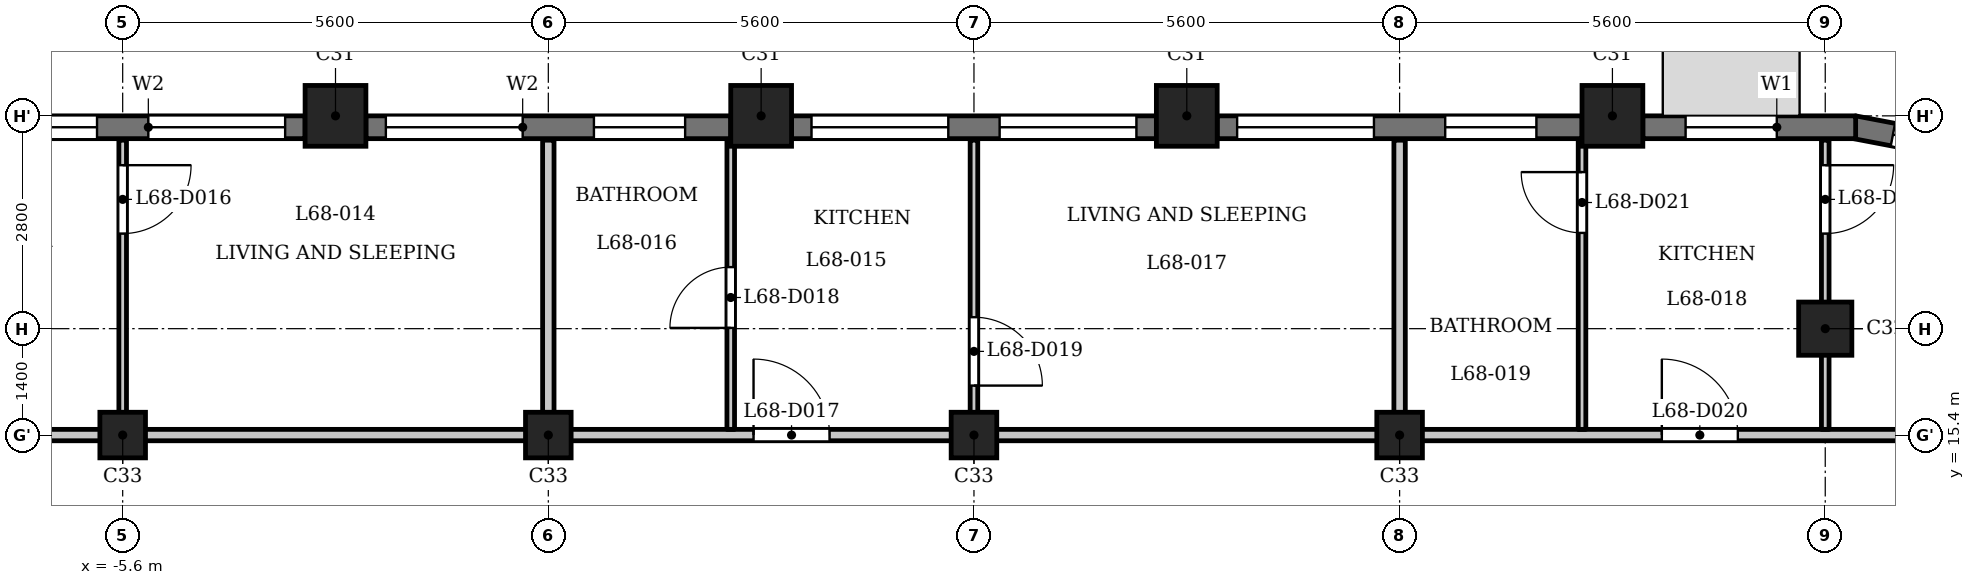
"""IFC4 building model, lengths in metres.
Left out: names, types, materials, properties, quantities, classifications, styles, units other than length and angle.
Written with IfcOpenShell. Run it as: python <this file> out.ifc"""

import sys

from ifc_helpers import new_model, si_unit, direction, frame, frame_2d, origin, origin_2d, place, context, subcontext, project, spatial, rectangle, extrude, element, fill, save


model = new_model("IFC4")
c1 = context("Model", 3, precision=1e-05, world=origin(), true_north=direction((0.0, 1.0)))
c2 = subcontext(c1, "Body", "Model", "MODEL_VIEW")
j1 = project(units=[si_unit("LENGTHUNIT", "METRE"), si_unit("PLANEANGLEUNIT", "RADIAN")], contexts=[c1])
p1 = place(None, origin())
s1 = spatial("IfcSite", under=j1, at=p1, CompositionType="ELEMENT")
p2 = place(p1, origin())
s2 = spatial("IfcBuilding", under=s1, at=p2, CompositionType="ELEMENT")
p3 = place(p2, frame((0.0, 0.0, 262.7)))
s3 = spatial("IfcBuildingStorey", under=s2, at=p3, CompositionType="ELEMENT", Elevation=262.7)
for number, where, z_axis, x_axis in (
    (1, (14.0, 19.6, 0.0), (0.0, 0.0, 1.0), (1.0, 0.0, 0.0)),
    (2, (8.4, 19.6, 0.0), (0.0, 0.0, 1.0), (1.0, 0.0, 0.0)),
    (3, (2.8, 19.6, 0.0), (0.0, 0.0, 1.0), (1.0, 0.0, 0.0)),
    (4, (-2.8, 19.6, 0.0), (0.0, 0.0, 1.0), (1.0, 0.0, 0.0)),
):
    element("IfcColumn", number, at=place(p3, frame(where, z_axis=z_axis, x_axis=x_axis)), inside=s3, PredefinedType="COLUMN", context=c2, shape_type="SweptSolid", body=[
        extrude(rectangle(XDim=0.8, YDim=0.8, at=origin_2d()), origin(), (0.0, 0.0, 1.0), 3.5),
    ])
p4 = place(p3, frame((16.8, 16.8, 0.0), z_axis=(0.0, 0.0, 1.0), x_axis=(1.0, 0.0, 0.0)))
e5 = element("IfcColumn", 5, at=p4, inside=s3, PredefinedType="COLUMN", context=c2, shape_type="SweptSolid", body=[
    extrude(rectangle(XDim=0.7, YDim=0.7, at=origin_2d()), origin(), (0.0, 0.0, 1.0), 3.5),
])
for number, where, z_axis, x_axis in (
    (6, (-5.6, 15.4, 0.0), (0.0, 0.0, 1.0), (1.0, 0.0, 0.0)),
    (7, (0.0, 15.4, 0.0), (0.0, 0.0, 1.0), (1.0, 0.0, 0.0)),
    (8, (5.6, 15.4, 0.0), (0.0, 0.0, 1.0), (1.0, 0.0, 0.0)),
    (9, (11.2, 15.4, 0.0), (0.0, 0.0, 1.0), (1.0, 0.0, 0.0)),
):
    element("IfcColumn", number, at=place(p3, frame(where, z_axis=z_axis, x_axis=x_axis)), inside=s3, PredefinedType="COLUMN", context=c2, shape_type="SweptSolid", body=[
        extrude(rectangle(XDim=0.6, YDim=0.6, at=origin_2d()), origin(), (0.0, 0.0, 1.0), 3.5),
    ])
p5 = place(p3, frame((18.995, 19.105, 0.0), z_axis=(0.0, 0.0, 1.0), x_axis=(-0.982301706131, 0.187305520826, 0.0)))
e10 = element("IfcWall", 10, at=p5, inside=s3, PredefinedType="SOLIDWALL", context=c2, shape_type="SweptSolid", body=[
    extrude(rectangle(XDim=1.856, YDim=0.3, at=frame_2d((0.928, 0.0))), origin(), (0.0, 0.0, 1.0), 2.55),
])
p6 = place(p5, frame((0.528, 0.0, 0.6)))
e11 = element("IfcOpeningElement", 11, at=p6, cuts=e10, PredefinedType="OPENING", context=c2, shape_type="SweptSolid", body=[
    extrude(rectangle(XDim=0.8, YDim=1.55, at=frame_2d((0.4, 0.775))), frame((0.0, 0.16, 0.0), z_axis=(0.0, -1.0, 0.0), x_axis=(1.0, 0.0, 0.0)), (0.0, 0.0, 1.0), 0.32),
])
p7 = place(p3, frame((17.2, 19.45, 0.0), z_axis=(0.0, 0.0, 1.0), x_axis=(-1.0, 0.0, 0.0)))
e12 = element("IfcWall", 12, at=p7, inside=s3, PredefinedType="SOLIDWALL", context=c2, shape_type="SweptSolid", body=[
    extrude(rectangle(XDim=2.8, YDim=0.3, at=frame_2d((1.4, 0.0))), origin(), (0.0, 0.0, 1.0), 2.55),
])
p8 = place(p7, frame((1.038, 0.0, 0.6)))
e13 = element("IfcOpeningElement", 13, at=p8, cuts=e12, PredefinedType="OPENING", context=c2, shape_type="SweptSolid", body=[
    extrude(rectangle(XDim=1.2, YDim=1.55, at=frame_2d((0.6, 0.775))), frame((0.0, 0.16, 0.0), z_axis=(0.0, -1.0, 0.0), x_axis=(1.0, 0.0, 0.0)), (0.0, 0.0, 1.0), 0.32),
])
p9 = place(p3, frame((13.6, 19.45, 0.0), z_axis=(0.0, 0.0, 1.0), x_axis=(-1.0, 0.0, 0.0)))
e14 = element("IfcWall", 14, at=p9, inside=s3, PredefinedType="SOLIDWALL", context=c2, shape_type="SweptSolid", body=[
    extrude(rectangle(XDim=4.8, YDim=0.3, at=frame_2d((2.4, 0.0))), origin(), (0.0, 0.0, 1.0), 2.55),
])
p10 = place(p9, frame((0.6, 0.0, 0.6)))
e15 = element("IfcOpeningElement", 15, at=p10, cuts=e14, PredefinedType="OPENING", context=c2, shape_type="SweptSolid", body=[
    extrude(rectangle(XDim=1.2, YDim=1.55, at=frame_2d((0.6, 0.775))), frame((0.0, 0.16, 0.0), z_axis=(0.0, -1.0, 0.0), x_axis=(1.0, 0.0, 0.0)), (0.0, 0.0, 1.0), 0.32),
])
p11 = place(p9, frame((2.738, 0.0, 0.9)))
e16 = element("IfcOpeningElement", 16, at=p11, cuts=e14, PredefinedType="OPENING", context=c2, shape_type="SweptSolid", body=[
    extrude(rectangle(XDim=1.8, YDim=1.25, at=frame_2d((0.9, 0.625))), frame((0.0, 0.16, 0.0), z_axis=(0.0, -1.0, 0.0), x_axis=(1.0, 0.0, 0.0)), (0.0, 0.0, 1.0), 0.32),
])
p12 = place(p3, frame((8.0, 19.45, 0.0), z_axis=(0.0, 0.0, 1.0), x_axis=(-1.0, 0.0, 0.0)))
e17 = element("IfcWall", 17, at=p12, inside=s3, PredefinedType="SOLIDWALL", context=c2, shape_type="SweptSolid", body=[
    extrude(rectangle(XDim=4.8, YDim=0.3, at=frame_2d((2.4, 0.0))), origin(), (0.0, 0.0, 1.0), 2.55),
])
p13 = place(p12, frame((0.262, 0.0, 0.9)))
e18 = element("IfcOpeningElement", 18, at=p13, cuts=e17, PredefinedType="OPENING", context=c2, shape_type="SweptSolid", body=[
    extrude(rectangle(XDim=1.8, YDim=1.25, at=frame_2d((0.9, 0.625))), frame((0.0, 0.16, 0.0), z_axis=(0.0, -1.0, 0.0), x_axis=(1.0, 0.0, 0.0)), (0.0, 0.0, 1.0), 0.32),
])
p14 = place(p12, frame((2.738, 0.0, 0.9)))
e19 = element("IfcOpeningElement", 19, at=p14, cuts=e17, PredefinedType="OPENING", context=c2, shape_type="SweptSolid", body=[
    extrude(rectangle(XDim=1.8, YDim=1.25, at=frame_2d((0.9, 0.625))), frame((0.0, 0.16, 0.0), z_axis=(0.0, -1.0, 0.0), x_axis=(1.0, 0.0, 0.0)), (0.0, 0.0, 1.0), 0.32),
])
p15 = place(p3, frame((2.4, 19.45, 0.0), z_axis=(0.0, 0.0, 1.0), x_axis=(-1.0, 0.0, 0.0)))
e20 = element("IfcWall", 20, at=p15, inside=s3, PredefinedType="SOLIDWALL", context=c2, shape_type="SweptSolid", body=[
    extrude(rectangle(XDim=4.8, YDim=0.3, at=frame_2d((2.4, 0.0))), origin(), (0.0, 0.0, 1.0), 2.55),
])
p16 = place(p15, frame((0.6, 0.0, 0.6)))
e21 = element("IfcOpeningElement", 21, at=p16, cuts=e20, PredefinedType="OPENING", context=c2, shape_type="SweptSolid", body=[
    extrude(rectangle(XDim=1.2, YDim=1.55, at=frame_2d((0.6, 0.775))), frame((0.0, 0.16, 0.0), z_axis=(0.0, -1.0, 0.0), x_axis=(1.0, 0.0, 0.0)), (0.0, 0.0, 1.0), 0.32),
])
p17 = place(p15, frame((2.738, 0.0, 0.9)))
e22 = element("IfcOpeningElement", 22, at=p17, cuts=e20, PredefinedType="OPENING", context=c2, shape_type="SweptSolid", body=[
    extrude(rectangle(XDim=1.8, YDim=1.25, at=frame_2d((0.9, 0.625))), frame((0.0, 0.16, 0.0), z_axis=(0.0, -1.0, 0.0), x_axis=(1.0, 0.0, 0.0)), (0.0, 0.0, 1.0), 0.32),
])
p18 = place(p3, frame((-3.2, 19.45, 0.0), z_axis=(0.0, 0.0, 1.0), x_axis=(-1.0, 0.0, 0.0)))
e23 = element("IfcWall", 23, at=p18, inside=s3, PredefinedType="SOLIDWALL", context=c2, shape_type="SweptSolid", body=[
    extrude(rectangle(XDim=4.8, YDim=0.3, at=frame_2d((2.4, 0.0))), origin(), (0.0, 0.0, 1.0), 2.55),
])
p19 = place(p18, frame((0.262, 0.0, 0.9)))
e24 = element("IfcOpeningElement", 24, at=p19, cuts=e23, PredefinedType="OPENING", context=c2, shape_type="SweptSolid", body=[
    extrude(rectangle(XDim=1.8, YDim=1.25, at=frame_2d((0.9, 0.625))), frame((0.0, 0.16, 0.0), z_axis=(0.0, -1.0, 0.0), x_axis=(1.0, 0.0, 0.0)), (0.0, 0.0, 1.0), 0.32),
])
p20 = place(p18, frame((2.738, 0.0, 0.9)))
e25 = element("IfcOpeningElement", 25, at=p20, cuts=e23, PredefinedType="OPENING", context=c2, shape_type="SweptSolid", body=[
    extrude(rectangle(XDim=1.8, YDim=1.25, at=frame_2d((0.9, 0.625))), frame((0.0, 0.16, 0.0), z_axis=(0.0, -1.0, 0.0), x_axis=(1.0, 0.0, 0.0)), (0.0, 0.0, 1.0), 0.32),
])
p21 = place(p3, frame((-23.55, 15.4, 0.0), z_axis=(0.0, 0.0, 1.0), x_axis=(1.0, 0.0, 0.0)))
e26 = element("IfcWall", 26, at=p21, inside=s3, PredefinedType="PARTITIONING", context=c2, shape_type="SweptSolid", body=[
    extrude(rectangle(XDim=46.872, YDim=0.15, at=frame_2d((23.436, 0.0))), origin(), (0.0, 0.0, 1.0), 3.2),
])
p22 = place(p21, frame((8.05, 0.0, 0.0)))
e27 = element("IfcOpeningElement", 27, at=p22, cuts=e26, PredefinedType="OPENING", context=c2, shape_type="SweptSolid", body=[
    extrude(rectangle(XDim=1.0, YDim=2.1, at=frame_2d((0.5, 1.05))), frame((0.0, 0.085, 0.0), z_axis=(0.0, -1.0, 0.0), x_axis=(1.0, 0.0, 0.0)), (0.0, 0.0, 1.0), 0.17),
])
p23 = place(p21, frame((15.05, 0.0, 0.0)))
e28 = element("IfcOpeningElement", 28, at=p23, cuts=e26, PredefinedType="OPENING", context=c2, shape_type="SweptSolid", body=[
    extrude(rectangle(XDim=1.0, YDim=2.1, at=frame_2d((0.5, 1.05))), frame((0.0, 0.085, 0.0), z_axis=(0.0, -1.0, 0.0), x_axis=(1.0, 0.0, 0.0)), (0.0, 0.0, 1.0), 0.17),
])
p24 = place(p21, frame((26.25, 0.0, 0.0)))
e29 = element("IfcOpeningElement", 29, at=p24, cuts=e26, PredefinedType="OPENING", context=c2, shape_type="SweptSolid", body=[
    extrude(rectangle(XDim=1.0, YDim=2.1, at=frame_2d((0.5, 1.05))), frame((0.0, 0.085, 0.0), z_axis=(0.0, -1.0, 0.0), x_axis=(1.0, 0.0, 0.0)), (0.0, 0.0, 1.0), 0.17),
])
p25 = place(p21, frame((38.2, 0.0, 0.0)))
e30 = element("IfcOpeningElement", 30, at=p25, cuts=e26, PredefinedType="OPENING", context=c2, shape_type="SweptSolid", body=[
    extrude(rectangle(XDim=1.0, YDim=2.1, at=frame_2d((0.5, 1.05))), frame((0.0, 0.085, 0.0), z_axis=(0.0, -1.0, 0.0), x_axis=(1.0, 0.0, 0.0)), (0.0, 0.0, 1.0), 0.17),
])
p26 = place(p3, frame((-5.6, 15.475, 0.0), z_axis=(0.0, 0.0, 1.0), x_axis=(0.0, 1.0, 0.0)))
e31 = element("IfcWall", 31, at=p26, inside=s3, PredefinedType="PARTITIONING", context=c2, shape_type="SweptSolid", body=[
    extrude(rectangle(XDim=3.805, YDim=0.1, at=frame_2d((1.902, 0.0))), origin(), (0.0, 0.0, 1.0), 3.2),
])
p27 = place(p26, frame((2.576, 0.0, 0.0)))
e32 = element("IfcOpeningElement", 32, at=p27, cuts=e31, PredefinedType="OPENING", context=c2, shape_type="SweptSolid", body=[
    extrude(rectangle(XDim=0.9, YDim=2.1, at=frame_2d((0.45, 1.05))), frame((0.0, 0.06, 0.0), z_axis=(0.0, -1.0, 0.0), x_axis=(1.0, 0.0, 0.0)), (0.0, 0.0, 1.0), 0.12),
])
p28 = place(p3, frame((0.0, 15.475, 0.0), z_axis=(0.0, 0.0, 1.0), x_axis=(0.0, 1.0, 0.0)))
e33 = element("IfcWall", 33, at=p28, inside=s3, PredefinedType="PARTITIONING", context=c2, shape_type="SweptSolid", body=[
    extrude(rectangle(XDim=3.805, YDim=0.15, at=frame_2d((1.902, 0.0))), origin(), (0.0, 0.0, 1.0), 3.2),
])
p29 = place(p3, frame((2.4, 15.475, 0.0), z_axis=(0.0, 0.0, 1.0), x_axis=(0.0, 1.0, 0.0)))
e34 = element("IfcWall", 34, at=p29, inside=s3, PredefinedType="PARTITIONING", context=c2, shape_type="SweptSolid", body=[
    extrude(rectangle(XDim=3.805, YDim=0.1, at=frame_2d((1.902, 0.0))), origin(), (0.0, 0.0, 1.0), 3.2),
])
p30 = place(p29, frame((1.335, 0.0, 0.0)))
e35 = element("IfcOpeningElement", 35, at=p30, cuts=e34, PredefinedType="OPENING", context=c2, shape_type="SweptSolid", body=[
    extrude(rectangle(XDim=0.8, YDim=2.1, at=frame_2d((0.4, 1.05))), frame((0.0, 0.06, 0.0), z_axis=(0.0, -1.0, 0.0), x_axis=(1.0, 0.0, 0.0)), (0.0, 0.0, 1.0), 0.12),
])
p31 = place(p3, frame((5.6, 15.475, 0.0), z_axis=(0.0, 0.0, 1.0), x_axis=(0.0, 1.0, 0.0)))
e36 = element("IfcWall", 36, at=p31, inside=s3, PredefinedType="PARTITIONING", context=c2, shape_type="SweptSolid", body=[
    extrude(rectangle(XDim=3.805, YDim=0.1, at=frame_2d((1.902, 0.0))), origin(), (0.0, 0.0, 1.0), 3.2),
])
p32 = place(p31, frame((0.576, 0.0, 0.0)))
e37 = element("IfcOpeningElement", 37, at=p32, cuts=e36, PredefinedType="OPENING", context=c2, shape_type="SweptSolid", body=[
    extrude(rectangle(XDim=0.9, YDim=2.1, at=frame_2d((0.45, 1.05))), frame((0.0, 0.06, 0.0), z_axis=(0.0, -1.0, 0.0), x_axis=(1.0, 0.0, 0.0)), (0.0, 0.0, 1.0), 0.12),
])
p33 = place(p3, frame((11.2, 15.475, 0.0), z_axis=(0.0, 0.0, 1.0), x_axis=(0.0, 1.0, 0.0)))
e38 = element("IfcWall", 38, at=p33, inside=s3, PredefinedType="PARTITIONING", context=c2, shape_type="SweptSolid", body=[
    extrude(rectangle(XDim=3.805, YDim=0.15, at=frame_2d((1.902, 0.0))), origin(), (0.0, 0.0, 1.0), 3.2),
])
p34 = place(p3, frame((13.6, 15.475, 0.0), z_axis=(0.0, 0.0, 1.0), x_axis=(0.0, 1.0, 0.0)))
e39 = element("IfcWall", 39, at=p34, inside=s3, PredefinedType="PARTITIONING", context=c2, shape_type="SweptSolid", body=[
    extrude(rectangle(XDim=3.805, YDim=0.1, at=frame_2d((1.902, 0.0))), origin(), (0.0, 0.0, 1.0), 3.2),
])
p35 = place(p34, frame((2.585, 0.0, 0.0)))
e40 = element("IfcOpeningElement", 40, at=p35, cuts=e39, PredefinedType="OPENING", context=c2, shape_type="SweptSolid", body=[
    extrude(rectangle(XDim=0.8, YDim=2.1, at=frame_2d((0.4, 1.05))), frame((0.0, 0.06, 0.0), z_axis=(0.0, -1.0, 0.0), x_axis=(1.0, 0.0, 0.0)), (0.0, 0.0, 1.0), 0.12),
])
p36 = place(p3, frame((16.8, 15.475, 0.0), z_axis=(0.0, 0.0, 1.0), x_axis=(0.0, 1.0, 0.0)))
e41 = element("IfcWall", 41, at=p36, inside=s3, PredefinedType="PARTITIONING", context=c2, shape_type="SweptSolid", body=[
    extrude(rectangle(XDim=3.805, YDim=0.1, at=frame_2d((1.902, 0.0))), origin(), (0.0, 0.0, 1.0), 3.2),
])
p37 = place(p36, frame((2.576, 0.0, 0.0)))
e42 = element("IfcOpeningElement", 42, at=p37, cuts=e41, PredefinedType="OPENING", context=c2, shape_type="SweptSolid", body=[
    extrude(rectangle(XDim=0.9, YDim=2.1, at=frame_2d((0.45, 1.05))), frame((0.0, 0.06, 0.0), z_axis=(0.0, -1.0, 0.0), x_axis=(1.0, 0.0, 0.0)), (0.0, 0.0, 1.0), 0.12),
])
p38 = place(p27, origin())
e43 = element("IfcDoor", 43, at=p38, inside=s3, OperationType="SINGLE_SWING_RIGHT", PredefinedType="DOOR", context=c2, shape_type="SweptSolid", body=[
    extrude(rectangle(XDim=0.9, YDim=2.1, at=frame_2d((0.45, 1.05))), frame((0.0, 0.025, 0.0), z_axis=(0.0, -1.0, 0.0), x_axis=(1.0, 0.0, 0.0)), (0.0, 0.0, 1.0), 0.05),
])
fill(e32, e43)
p39 = place(p24, origin())
e44 = element("IfcDoor", 44, at=p39, inside=s3, OperationType="SINGLE_SWING_RIGHT", PredefinedType="DOOR", context=c2, shape_type="SweptSolid", body=[
    extrude(rectangle(XDim=1.0, YDim=2.1, at=frame_2d((0.5, 1.05))), frame((0.0, 0.025, 0.0), z_axis=(0.0, -1.0, 0.0), x_axis=(1.0, 0.0, 0.0)), (0.0, 0.0, 1.0), 0.05),
])
fill(e29, e44)
p40 = place(p30, origin())
e45 = element("IfcDoor", 45, at=p40, inside=s3, OperationType="SINGLE_SWING_RIGHT", PredefinedType="DOOR", context=c2, shape_type="SweptSolid", body=[
    extrude(rectangle(XDim=0.8, YDim=2.1, at=frame_2d((0.4, 1.05))), frame((0.0, 0.025, 0.0), z_axis=(0.0, -1.0, 0.0), x_axis=(1.0, 0.0, 0.0)), (0.0, 0.0, 1.0), 0.05),
])
fill(e35, e45)
p41 = place(p32, origin())
e46 = element("IfcDoor", 46, at=p41, inside=s3, OperationType="SINGLE_SWING_LEFT", PredefinedType="DOOR", context=c2, shape_type="SweptSolid", body=[
    extrude(rectangle(XDim=0.9, YDim=2.1, at=frame_2d((0.45, 1.05))), frame((0.0, 0.025, 0.0), z_axis=(0.0, -1.0, 0.0), x_axis=(1.0, 0.0, 0.0)), (0.0, 0.0, 1.0), 0.05),
])
fill(e37, e46)
p42 = place(p25, origin())
e47 = element("IfcDoor", 47, at=p42, inside=s3, OperationType="SINGLE_SWING_RIGHT", PredefinedType="DOOR", context=c2, shape_type="SweptSolid", body=[
    extrude(rectangle(XDim=1.0, YDim=2.1, at=frame_2d((0.5, 1.05))), frame((0.0, 0.025, 0.0), z_axis=(0.0, -1.0, 0.0), x_axis=(1.0, 0.0, 0.0)), (0.0, 0.0, 1.0), 0.05),
])
fill(e30, e47)
p43 = place(p35, origin())
e48 = element("IfcDoor", 48, at=p43, inside=s3, OperationType="SINGLE_SWING_LEFT", PredefinedType="DOOR", context=c2, shape_type="SweptSolid", body=[
    extrude(rectangle(XDim=0.8, YDim=2.1, at=frame_2d((0.4, 1.05))), frame((0.0, 0.025, 0.0), z_axis=(0.0, -1.0, 0.0), x_axis=(1.0, 0.0, 0.0)), (0.0, 0.0, 1.0), 0.05),
])
fill(e40, e48)
p44 = place(p37, origin())
e49 = element("IfcDoor", 49, at=p44, inside=s3, OperationType="SINGLE_SWING_RIGHT", PredefinedType="DOOR", context=c2, shape_type="SweptSolid", body=[
    extrude(rectangle(XDim=0.9, YDim=2.1, at=frame_2d((0.45, 1.05))), frame((0.0, 0.025, 0.0), z_axis=(0.0, -1.0, 0.0), x_axis=(1.0, 0.0, 0.0)), (0.0, 0.0, 1.0), 0.05),
])
fill(e42, e49)
p45 = place(p6, origin())
e50 = element("IfcWindow", 50, at=p45, inside=s3, PartitioningType="SINGLE_PANEL", PredefinedType="WINDOW", context=c2, shape_type="SweptSolid", body=[
    extrude(rectangle(XDim=0.8, YDim=1.55, at=frame_2d((0.4, 0.775))), frame((0.0, 0.03, 0.0), z_axis=(0.0, -1.0, 0.0), x_axis=(1.0, 0.0, 0.0)), (0.0, 0.0, 1.0), 0.06),
])
fill(e11, e50)
p46 = place(p8, origin())
e51 = element("IfcWindow", 51, at=p46, inside=s3, PartitioningType="SINGLE_PANEL", PredefinedType="WINDOW", context=c2, shape_type="SweptSolid", body=[
    extrude(rectangle(XDim=1.2, YDim=1.55, at=frame_2d((0.6, 0.775))), frame((0.0, 0.03, 0.0), z_axis=(0.0, -1.0, 0.0), x_axis=(1.0, 0.0, 0.0)), (0.0, 0.0, 1.0), 0.06),
])
fill(e13, e51)
p47 = place(p10, origin())
e52 = element("IfcWindow", 52, at=p47, inside=s3, PartitioningType="SINGLE_PANEL", PredefinedType="WINDOW", context=c2, shape_type="SweptSolid", body=[
    extrude(rectangle(XDim=1.2, YDim=1.55, at=frame_2d((0.6, 0.775))), frame((0.0, 0.03, 0.0), z_axis=(0.0, -1.0, 0.0), x_axis=(1.0, 0.0, 0.0)), (0.0, 0.0, 1.0), 0.06),
])
fill(e15, e52)
p48 = place(p11, origin())
e53 = element("IfcWindow", 53, at=p48, inside=s3, PartitioningType="SINGLE_PANEL", PredefinedType="WINDOW", context=c2, shape_type="SweptSolid", body=[
    extrude(rectangle(XDim=1.8, YDim=1.25, at=frame_2d((0.9, 0.625))), frame((0.0, 0.03, 0.0), z_axis=(0.0, -1.0, 0.0), x_axis=(1.0, 0.0, 0.0)), (0.0, 0.0, 1.0), 0.06),
])
fill(e16, e53)
p49 = place(p13, origin())
e54 = element("IfcWindow", 54, at=p49, inside=s3, PartitioningType="SINGLE_PANEL", PredefinedType="WINDOW", context=c2, shape_type="SweptSolid", body=[
    extrude(rectangle(XDim=1.8, YDim=1.25, at=frame_2d((0.9, 0.625))), frame((0.0, 0.03, 0.0), z_axis=(0.0, -1.0, 0.0), x_axis=(1.0, 0.0, 0.0)), (0.0, 0.0, 1.0), 0.06),
])
fill(e18, e54)
p50 = place(p14, origin())
e55 = element("IfcWindow", 55, at=p50, inside=s3, PartitioningType="SINGLE_PANEL", PredefinedType="WINDOW", context=c2, shape_type="SweptSolid", body=[
    extrude(rectangle(XDim=1.8, YDim=1.25, at=frame_2d((0.9, 0.625))), frame((0.0, 0.03, 0.0), z_axis=(0.0, -1.0, 0.0), x_axis=(1.0, 0.0, 0.0)), (0.0, 0.0, 1.0), 0.06),
])
fill(e19, e55)
p51 = place(p16, origin())
e56 = element("IfcWindow", 56, at=p51, inside=s3, PartitioningType="SINGLE_PANEL", PredefinedType="WINDOW", context=c2, shape_type="SweptSolid", body=[
    extrude(rectangle(XDim=1.2, YDim=1.55, at=frame_2d((0.6, 0.775))), frame((0.0, 0.03, 0.0), z_axis=(0.0, -1.0, 0.0), x_axis=(1.0, 0.0, 0.0)), (0.0, 0.0, 1.0), 0.06),
])
fill(e21, e56)
p52 = place(p17, origin())
e57 = element("IfcWindow", 57, at=p52, inside=s3, PartitioningType="SINGLE_PANEL", PredefinedType="WINDOW", context=c2, shape_type="SweptSolid", body=[
    extrude(rectangle(XDim=1.8, YDim=1.25, at=frame_2d((0.9, 0.625))), frame((0.0, 0.03, 0.0), z_axis=(0.0, -1.0, 0.0), x_axis=(1.0, 0.0, 0.0)), (0.0, 0.0, 1.0), 0.06),
])
fill(e22, e57)
p53 = place(p19, origin())
e58 = element("IfcWindow", 58, at=p53, inside=s3, PartitioningType="SINGLE_PANEL", PredefinedType="WINDOW", context=c2, shape_type="SweptSolid", body=[
    extrude(rectangle(XDim=1.8, YDim=1.25, at=frame_2d((0.9, 0.625))), frame((0.0, 0.03, 0.0), z_axis=(0.0, -1.0, 0.0), x_axis=(1.0, 0.0, 0.0)), (0.0, 0.0, 1.0), 0.06),
])
fill(e24, e58)
p54 = place(p20, origin())
e59 = element("IfcWindow", 59, at=p54, inside=s3, PartitioningType="SINGLE_PANEL", PredefinedType="WINDOW", context=c2, shape_type="SweptSolid", body=[
    extrude(rectangle(XDim=1.8, YDim=1.25, at=frame_2d((0.9, 0.625))), frame((0.0, 0.03, 0.0), z_axis=(0.0, -1.0, 0.0), x_axis=(1.0, 0.0, 0.0)), (0.0, 0.0, 1.0), 0.06),
])
fill(e25, e59)
save(model, sys.argv[1])
